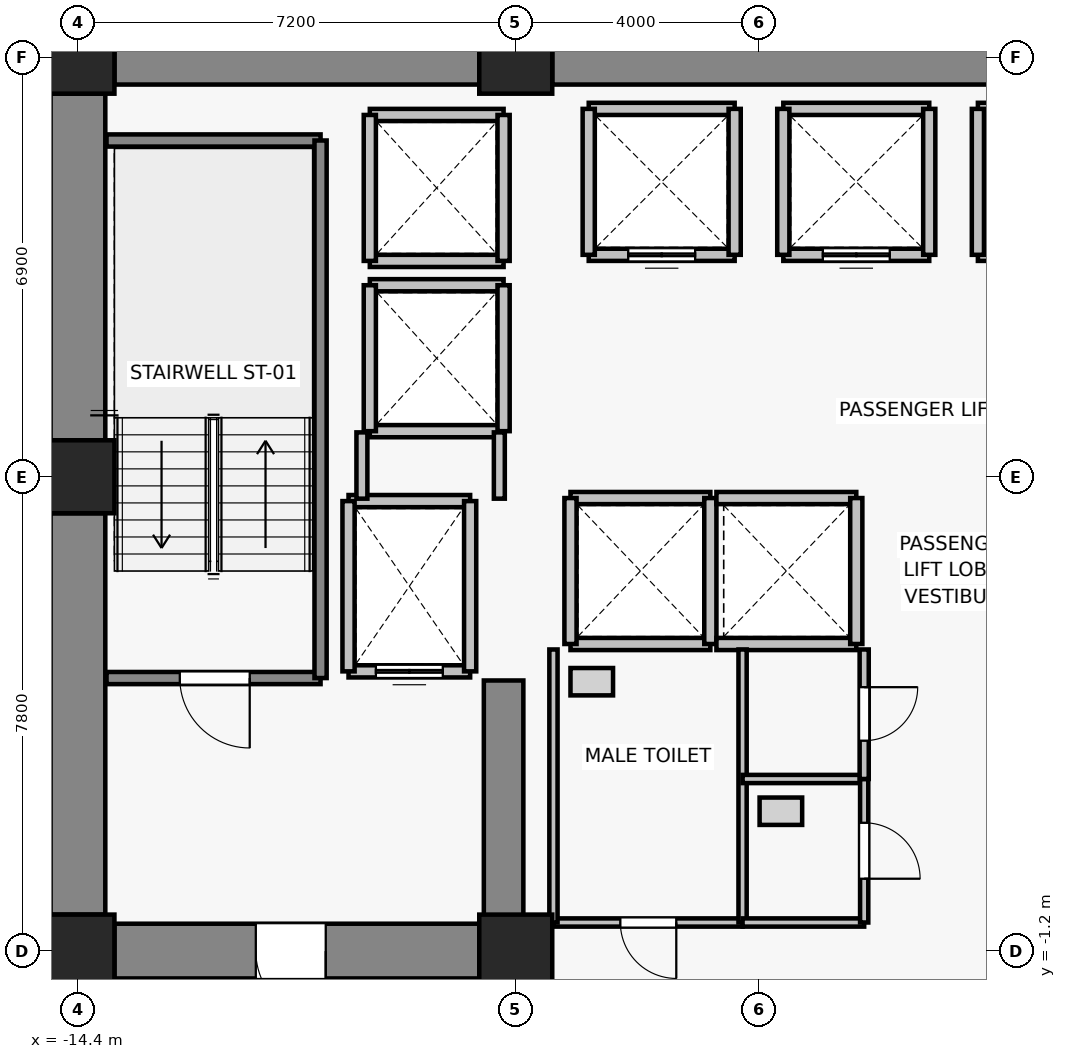
"""IFC4 building model, lengths in metres.
Left out: names, types, materials, properties, quantities, classifications, styles, units other than length and angle.
Written with IfcOpenShell. Run it as: python <this file> out.ifc"""

import sys

from ifc_helpers import new_model, si_unit, direction, frame, frame_2d, origin, origin_2d, place, context, subcontext, project, spatial, rectangle, extrude, source, transform, mapped, element, fill, save


model = new_model("IFC4")
c1 = context("Model", 3, precision=1e-05, world=origin(), true_north=direction((0.0, 1.0)))
c2 = subcontext(c1, "Body", "Model", "MODEL_VIEW")
j1 = project(units=[si_unit("LENGTHUNIT", "METRE"), si_unit("PLANEANGLEUNIT", "RADIAN")], contexts=[c1])
p1 = place(None, origin())
s1 = spatial("IfcSite", under=j1, at=p1, CompositionType="ELEMENT")
p2 = place(p1, origin())
s2 = spatial("IfcBuilding", under=s1, at=p2, CompositionType="ELEMENT")
p3 = place(p2, frame((0.0, 0.0, 47.2)))
s3 = spatial("IfcBuildingStorey", under=s2, at=p3, CompositionType="ELEMENT", Elevation=47.2)
for number, where, z_axis, x_axis in (
    (1, (-14.4, -1.2, 0.0), (0.0, 0.0, 1.0), (1.0, 0.0, 0.0)),
    (2, (-7.2, -1.2, 0.0), (0.0, 0.0, 1.0), (1.0, 0.0, 0.0)),
    (3, (-14.4, 6.6, 0.0), (0.0, 0.0, 1.0), (1.0, 0.0, 0.0)),
    (4, (-14.4, 13.5, 0.0), (0.0, 0.0, 1.0), (1.0, 0.0, 0.0)),
    (5, (-7.2, 13.5, 0.0), (0.0, 0.0, 1.0), (1.0, 0.0, 0.0)),
):
    element("IfcColumn", number, at=place(p3, frame(where, z_axis=z_axis, x_axis=x_axis)), inside=s3, PredefinedType="COLUMN", context=c2, shape_type="SweptSolid", body=[
        extrude(rectangle(XDim=1.2, YDim=1.2, at=origin_2d()), origin(), (0.0, 0.0, 1.0), 3.3),
    ])
p4 = place(p3, frame((-13.8, 13.5, 0.0), z_axis=(0.0, 0.0, 1.0), x_axis=(1.0, 0.0, 0.0)))
e6 = element("IfcWall", 6, at=p4, inside=s3, PredefinedType="SHEAR", context=c2, shape_type="SweptSolid", body=[
    extrude(rectangle(XDim=6.0, YDim=0.9, at=frame_2d((3.0, 0.0))), origin(), (0.0, 0.0, 1.0), 3.075),
])
p5 = place(p3, frame((-6.6, 13.5, 0.0), z_axis=(0.0, 0.0, 1.0), x_axis=(1.0, 0.0, 0.0)))
e7 = element("IfcWall", 7, at=p5, inside=s3, PredefinedType="SHEAR", context=c2, shape_type="SweptSolid", body=[
    extrude(rectangle(XDim=13.2, YDim=0.9, at=frame_2d((6.6, 0.0))), origin(), (0.0, 0.0, 1.0), 3.075),
])
p6 = place(p3, frame((-14.4, -0.6, 0.0), z_axis=(0.0, 0.0, 1.0), x_axis=(0.0, 1.0, 0.0)))
e8 = element("IfcWall", 8, at=p6, inside=s3, PredefinedType="SHEAR", context=c2, shape_type="SweptSolid", body=[
    extrude(rectangle(XDim=6.6, YDim=0.9, at=frame_2d((3.3, 0.0))), origin(), (0.0, 0.0, 1.0), 3.075),
])
p7 = place(p3, frame((-14.4, 7.2, 0.0), z_axis=(0.0, 0.0, 1.0), x_axis=(0.0, 1.0, 0.0)))
e9 = element("IfcWall", 9, at=p7, inside=s3, PredefinedType="SHEAR", context=c2, shape_type="SweptSolid", body=[
    extrude(rectangle(XDim=5.7, YDim=0.9, at=frame_2d((2.85, 0.0))), origin(), (0.0, 0.0, 1.0), 3.075),
])
p8 = place(p3, frame((-7.8, -1.2, 0.0), z_axis=(0.0, 0.0, 1.0), x_axis=(-1.0, 0.0, 0.0)))
e10 = element("IfcWall", 10, at=p8, inside=s3, PredefinedType="SHEAR", context=c2, shape_type="SweptSolid", body=[
    extrude(rectangle(XDim=6.0, YDim=0.9, at=frame_2d((3.0, 0.0))), origin(), (0.0, 0.0, 1.0), 3.075),
])
p9 = place(p8, frame((2.525, 0.0, 0.0)))
e11 = element("IfcOpeningElement", 11, at=p9, cuts=e10, PredefinedType="OPENING", context=c2, shape_type="SweptSolid", body=[
    extrude(rectangle(XDim=1.15, YDim=2.15, at=frame_2d((0.575, 1.075))), frame((0.0, 0.46, 0.0), z_axis=(0.0, -1.0, 0.0), x_axis=(1.0, 0.0, 0.0)), (0.0, 0.0, 1.0), 0.92),
])
p10 = place(p3, frame((-7.4, -0.75, 0.0), z_axis=(0.0, 0.0, 1.0), x_axis=(0.0, 1.0, 0.0)))
e12 = element("IfcWall", 12, at=p10, inside=s3, PredefinedType="SHEAR", context=c2, shape_type="SweptSolid", body=[
    extrude(rectangle(XDim=4.0, YDim=0.65, at=frame_2d((2.0, 0.0))), origin(), (0.0, 0.0, 1.0), 3.075),
])
p11 = place(p3, frame((-7.95, 3.4, 0.0), z_axis=(0.0, 0.0, 1.0), x_axis=(-1.0, 0.0, 0.0)))
e13 = element("IfcWall", 13, at=p11, inside=s3, PredefinedType="SOLIDWALL", context=c2, shape_type="SweptSolid", body=[
    extrude(rectangle(XDim=2.0, YDim=0.2, at=frame_2d((1.0, 0.0))), origin(), (0.0, 0.0, 1.0), 3.075),
])
p12 = place(p11, frame((0.45, 0.0, 0.0)))
e14 = element("IfcOpeningElement", 14, at=p12, cuts=e13, PredefinedType="OPENING", context=c2, shape_type="SweptSolid", body=[
    extrude(rectangle(XDim=1.1, YDim=2.2, at=frame_2d((0.55, 1.1))), frame((0.0, 0.11, 0.0), z_axis=(0.0, -1.0, 0.0), x_axis=(1.0, 0.0, 0.0)), (0.0, 0.0, 1.0), 0.22),
])
p13 = place(p3, frame((-9.95, 6.2, 0.0), z_axis=(0.0, 0.0, 1.0), x_axis=(1.0, 0.0, 0.0)))
e15 = element("IfcWall", 15, at=p13, inside=s3, PredefinedType="SOLIDWALL", context=c2, shape_type="SweptSolid", body=[
    extrude(rectangle(XDim=2.0, YDim=0.2, at=frame_2d((1.0, 0.0))), origin(), (0.0, 0.0, 1.0), 3.075),
])
for number, where, z_axis, x_axis in (
    (16, (-9.95, 3.4, 0.0), (0.0, 0.0, 1.0), (0.0, 1.0, 0.0)),
    (17, (-7.95, 6.2, 0.0), (0.0, 0.0, 1.0), (0.0, -1.0, 0.0)),
):
    element("IfcWall", number, at=place(p3, frame(where, z_axis=z_axis, x_axis=x_axis)), inside=s3, PredefinedType="SOLIDWALL", context=c2, shape_type="SweptSolid", body=[
        extrude(rectangle(XDim=2.8, YDim=0.2, at=frame_2d((1.4, 0.0))), origin(), (0.0, 0.0, 1.0), 3.075),
    ])
p14 = place(p3, frame((-3.6, 10.25, 0.0), z_axis=(0.0, 0.0, 1.0), x_axis=(-1.0, 0.0, 0.0)))
e18 = element("IfcWall", 18, at=p14, inside=s3, PredefinedType="SOLIDWALL", context=c2, shape_type="SweptSolid", body=[
    extrude(rectangle(XDim=2.4, YDim=0.2, at=frame_2d((1.2, 0.0))), origin(), (0.0, 0.0, 1.0), 3.075),
])
p15 = place(p14, frame((0.65, 0.0, 0.0)))
e19 = element("IfcOpeningElement", 19, at=p15, cuts=e18, PredefinedType="OPENING", context=c2, shape_type="SweptSolid", body=[
    extrude(rectangle(XDim=1.1, YDim=2.2, at=frame_2d((0.55, 1.1))), frame((0.0, 0.11, 0.0), z_axis=(0.0, -1.0, 0.0), x_axis=(1.0, 0.0, 0.0)), (0.0, 0.0, 1.0), 0.22),
])
for number, where, z_axis, x_axis in (
    (20, (-6.0, 12.65, 0.0), (0.0, 0.0, 1.0), (1.0, 0.0, 0.0)),
    (21, (-6.0, 10.25, 0.0), (0.0, 0.0, 1.0), (0.0, 1.0, 0.0)),
    (22, (-3.6, 12.65, 0.0), (0.0, 0.0, 1.0), (0.0, -1.0, 0.0)),
):
    element("IfcWall", number, at=place(p3, frame(where, z_axis=z_axis, x_axis=x_axis)), inside=s3, PredefinedType="SOLIDWALL", context=c2, shape_type="SweptSolid", body=[
        extrude(rectangle(XDim=2.4, YDim=0.2, at=frame_2d((1.2, 0.0))), origin(), (0.0, 0.0, 1.0), 3.075),
    ])
p16 = place(p3, frame((-0.4, 10.25, 0.0), z_axis=(0.0, 0.0, 1.0), x_axis=(-1.0, 0.0, 0.0)))
e23 = element("IfcWall", 23, at=p16, inside=s3, PredefinedType="SOLIDWALL", context=c2, shape_type="SweptSolid", body=[
    extrude(rectangle(XDim=2.4, YDim=0.2, at=frame_2d((1.2, 0.0))), origin(), (0.0, 0.0, 1.0), 3.075),
])
p17 = place(p16, frame((0.65, 0.0, 0.0)))
e24 = element("IfcOpeningElement", 24, at=p17, cuts=e23, PredefinedType="OPENING", context=c2, shape_type="SweptSolid", body=[
    extrude(rectangle(XDim=1.1, YDim=2.2, at=frame_2d((0.55, 1.1))), frame((0.0, 0.11, 0.0), z_axis=(0.0, -1.0, 0.0), x_axis=(1.0, 0.0, 0.0)), (0.0, 0.0, 1.0), 0.22),
])
p18 = place(p3, frame((-2.8, 12.65, 0.0), z_axis=(0.0, 0.0, 1.0), x_axis=(1.0, 0.0, 0.0)))
e25 = element("IfcWall", 25, at=p18, inside=s3, PredefinedType="SOLIDWALL", context=c2, shape_type="SweptSolid", body=[
    extrude(rectangle(XDim=2.4, YDim=0.2, at=frame_2d((1.2, 0.0))), origin(), (0.0, 0.0, 1.0), 3.075),
])
for number, where, z_axis, x_axis in (
    (26, (-2.8, 10.25, 0.0), (0.0, 0.0, 1.0), (0.0, 1.0, 0.0)),
    (27, (-0.4, 12.65, 0.0), (0.0, 0.0, 1.0), (0.0, -1.0, 0.0)),
):
    element("IfcWall", number, at=place(p3, frame(where, z_axis=z_axis, x_axis=x_axis)), inside=s3, PredefinedType="SOLIDWALL", context=c2, shape_type="SweptSolid", body=[
        extrude(rectangle(XDim=2.4, YDim=0.2, at=frame_2d((1.2, 0.0))), origin(), (0.0, 0.0, 1.0), 3.075),
    ])
p19 = place(p3, frame((2.8, 10.25, 0.0), z_axis=(0.0, 0.0, 1.0), x_axis=(-1.0, 0.0, 0.0)))
e28 = element("IfcWall", 28, at=p19, inside=s3, PredefinedType="SOLIDWALL", context=c2, shape_type="SweptSolid", body=[
    extrude(rectangle(XDim=2.4, YDim=0.2, at=frame_2d((1.2, 0.0))), origin(), (0.0, 0.0, 1.0), 3.075),
])
p20 = place(p19, frame((0.65, 0.0, 0.0)))
e29 = element("IfcOpeningElement", 29, at=p20, cuts=e28, PredefinedType="OPENING", context=c2, shape_type="SweptSolid", body=[
    extrude(rectangle(XDim=1.1, YDim=2.2, at=frame_2d((0.55, 1.1))), frame((0.0, 0.11, 0.0), z_axis=(0.0, -1.0, 0.0), x_axis=(1.0, 0.0, 0.0)), (0.0, 0.0, 1.0), 0.22),
])
p21 = place(p3, frame((0.4, 12.65, 0.0), z_axis=(0.0, 0.0, 1.0), x_axis=(1.0, 0.0, 0.0)))
e30 = element("IfcWall", 30, at=p21, inside=s3, PredefinedType="SOLIDWALL", context=c2, shape_type="SweptSolid", body=[
    extrude(rectangle(XDim=2.4, YDim=0.2, at=frame_2d((1.2, 0.0))), origin(), (0.0, 0.0, 1.0), 3.075),
])
p22 = place(p3, frame((0.4, 10.25, 0.0), z_axis=(0.0, 0.0, 1.0), x_axis=(0.0, 1.0, 0.0)))
e31 = element("IfcWall", 31, at=p22, inside=s3, PredefinedType="SOLIDWALL", context=c2, shape_type="SweptSolid", body=[
    extrude(rectangle(XDim=2.4, YDim=0.2, at=frame_2d((1.2, 0.0))), origin(), (0.0, 0.0, 1.0), 3.075),
])
for number, where, z_axis, x_axis in (
    (32, (-4.0, 3.85, 0.0), (0.0, 0.0, 1.0), (-1.0, 0.0, 0.0)),
    (33, (-6.3, 6.25, 0.0), (0.0, 0.0, 1.0), (1.0, 0.0, 0.0)),
):
    element("IfcWall", number, at=place(p3, frame(where, z_axis=z_axis, x_axis=x_axis)), inside=s3, PredefinedType="SOLIDWALL", context=c2, shape_type="SweptSolid", body=[
        extrude(rectangle(XDim=2.3, YDim=0.2, at=frame_2d((1.15, 0.0))), origin(), (0.0, 0.0, 1.0), 3.075),
    ])
for number, where, z_axis, x_axis in (
    (34, (-6.3, 3.85, 0.0), (0.0, 0.0, 1.0), (0.0, 1.0, 0.0)),
    (35, (-4.0, 6.25, 0.0), (0.0, 0.0, 1.0), (0.0, -1.0, 0.0)),
):
    element("IfcWall", number, at=place(p3, frame(where, z_axis=z_axis, x_axis=x_axis)), inside=s3, PredefinedType="SOLIDWALL", context=c2, shape_type="SweptSolid", body=[
        extrude(rectangle(XDim=2.4, YDim=0.2, at=frame_2d((1.2, 0.0))), origin(), (0.0, 0.0, 1.0), 3.075),
    ])
for number, where, z_axis, x_axis in (
    (36, (-1.6, 3.85, 0.0), (0.0, 0.0, 1.0), (-1.0, 0.0, 0.0)),
    (37, (-3.9, 6.25, 0.0), (0.0, 0.0, 1.0), (1.0, 0.0, 0.0)),
):
    element("IfcWall", number, at=place(p3, frame(where, z_axis=z_axis, x_axis=x_axis)), inside=s3, PredefinedType="SOLIDWALL", context=c2, shape_type="SweptSolid", body=[
        extrude(rectangle(XDim=2.3, YDim=0.2, at=frame_2d((1.15, 0.0))), origin(), (0.0, 0.0, 1.0), 3.075),
    ])
p23 = place(p3, frame((-1.6, 6.25, 0.0), z_axis=(0.0, 0.0, 1.0), x_axis=(0.0, -1.0, 0.0)))
e38 = element("IfcWall", 38, at=p23, inside=s3, PredefinedType="SOLIDWALL", context=c2, shape_type="SweptSolid", body=[
    extrude(rectangle(XDim=2.4, YDim=0.2, at=frame_2d((1.2, 0.0))), origin(), (0.0, 0.0, 1.0), 3.075),
])
for number, where, z_axis, x_axis in (
    (39, (-7.4, 7.35, 0.0), (0.0, 0.0, 1.0), (-1.0, 0.0, 0.0)),
    (40, (-9.6, 9.75, 0.0), (0.0, 0.0, 1.0), (1.0, 0.0, 0.0)),
):
    element("IfcWall", number, at=place(p3, frame(where, z_axis=z_axis, x_axis=x_axis)), inside=s3, PredefinedType="SOLIDWALL", context=c2, shape_type="SweptSolid", body=[
        extrude(rectangle(XDim=2.2, YDim=0.2, at=frame_2d((1.1, 0.0))), origin(), (0.0, 0.0, 1.0), 2.465),
    ])
p24 = place(p3, frame((-9.6, 7.35, 0.0), z_axis=(0.0, 0.0, 1.0), x_axis=(0.0, 1.0, 0.0)))
e41 = element("IfcWall", 41, at=p24, inside=s3, PredefinedType="SOLIDWALL", context=c2, shape_type="SweptSolid", body=[
    extrude(rectangle(XDim=2.4, YDim=0.2, at=frame_2d((1.2, 0.0))), origin(), (0.0, 0.0, 1.0), 3.075),
])
p25 = place(p3, frame((-7.4, 9.75, 0.0), z_axis=(0.0, 0.0, 1.0), x_axis=(0.0, -1.0, 0.0)))
e42 = element("IfcWall", 42, at=p25, inside=s3, PredefinedType="SOLIDWALL", context=c2, shape_type="SweptSolid", body=[
    extrude(rectangle(XDim=2.4, YDim=0.2, at=frame_2d((1.2, 0.0))), origin(), (0.0, 0.0, 1.0), 2.465),
])
for number, where, z_axis, x_axis in (
    (43, (-7.4, 10.15, 0.0), (0.0, 0.0, 1.0), (-1.0, 0.0, 0.0)),
    (44, (-9.6, 12.55, 0.0), (0.0, 0.0, 1.0), (1.0, 0.0, 0.0)),
):
    element("IfcWall", number, at=place(p3, frame(where, z_axis=z_axis, x_axis=x_axis)), inside=s3, PredefinedType="SOLIDWALL", context=c2, shape_type="SweptSolid", body=[
        extrude(rectangle(XDim=2.2, YDim=0.2, at=frame_2d((1.1, 0.0))), origin(), (0.0, 0.0, 1.0), 2.465),
    ])
p26 = place(p3, frame((-9.6, 10.15, 0.0), z_axis=(0.0, 0.0, 1.0), x_axis=(0.0, 1.0, 0.0)))
e45 = element("IfcWall", 45, at=p26, inside=s3, PredefinedType="SOLIDWALL", context=c2, shape_type="SweptSolid", body=[
    extrude(rectangle(XDim=2.4, YDim=0.2, at=frame_2d((1.2, 0.0))), origin(), (0.0, 0.0, 1.0), 3.075),
])
p27 = place(p3, frame((-7.4, 12.55, 0.0), z_axis=(0.0, 0.0, 1.0), x_axis=(0.0, -1.0, 0.0)))
e46 = element("IfcWall", 46, at=p27, inside=s3, PredefinedType="SOLIDWALL", context=c2, shape_type="SweptSolid", body=[
    extrude(rectangle(XDim=2.4, YDim=0.2, at=frame_2d((1.2, 0.0))), origin(), (0.0, 0.0, 1.0), 2.465),
])
p28 = place(p3, frame((-10.41, 3.29, 0.0), z_axis=(0.0, 0.0, 1.0), x_axis=(-1.0, 0.0, 0.0)))
e47 = element("IfcWall", 47, at=p28, inside=s3, PredefinedType="SOLIDWALL", context=c2, shape_type="SweptSolid", body=[
    extrude(rectangle(XDim=3.52, YDim=0.2, at=frame_2d((1.76, 0.0))), origin(), (0.0, 0.0, 1.0), 3.075),
])
p29 = place(p28, frame((1.165, 0.0, 0.0)))
e48 = element("IfcOpeningElement", 48, at=p29, cuts=e47, PredefinedType="OPENING", context=c2, shape_type="SweptSolid", body=[
    extrude(rectangle(XDim=1.15, YDim=2.15, at=frame_2d((0.575, 1.075))), frame((0.0, 0.11, 0.0), z_axis=(0.0, -1.0, 0.0), x_axis=(1.0, 0.0, 0.0)), (0.0, 0.0, 1.0), 0.22),
])
p30 = place(p3, frame((-13.93, 12.13, 0.0), z_axis=(0.0, 0.0, 1.0), x_axis=(1.0, 0.0, 0.0)))
e49 = element("IfcWall", 49, at=p30, inside=s3, PredefinedType="SOLIDWALL", context=c2, shape_type="SweptSolid", body=[
    extrude(rectangle(XDim=3.52, YDim=0.2, at=frame_2d((1.76, 0.0))), origin(), (0.0, 0.0, 1.0), 3.075),
])
p31 = place(p3, frame((-10.41, 12.13, 0.0), z_axis=(0.0, 0.0, 1.0), x_axis=(0.0, -1.0, 0.0)))
e50 = element("IfcWall", 50, at=p31, inside=s3, PredefinedType="SOLIDWALL", context=c2, shape_type="SweptSolid", body=[
    extrude(rectangle(XDim=8.84, YDim=0.2, at=frame_2d((4.42, 0.0))), origin(), (0.0, 0.0, 1.0), 3.075),
])
p32 = place(p3, frame((-9.73, 6.24, 0.0), z_axis=(0.0, 0.0, 1.0), x_axis=(0.0, 1.0, 0.0)))
e51 = element("IfcWall", 51, at=p32, inside=s3, PredefinedType="PARTITIONING", context=c2, shape_type="SweptSolid", body=[
    extrude(rectangle(XDim=1.09, YDim=0.18, at=frame_2d((0.545, 0.0))), origin(), (0.0, 0.0, 1.0), 3.075),
])
p33 = place(p3, frame((-7.47, 7.33, 0.0), z_axis=(0.0, 0.0, 1.0), x_axis=(0.0, -1.0, 0.0)))
e52 = element("IfcWall", 52, at=p33, inside=s3, PredefinedType="PARTITIONING", context=c2, shape_type="SweptSolid", body=[
    extrude(rectangle(XDim=1.09, YDim=0.18, at=frame_2d((0.545, 0.0))), origin(), (0.0, 0.0, 1.0), 2.465),
])
p34 = place(p3, frame((-3.47, -0.73, 0.0), z_axis=(0.0, 0.0, 1.0), x_axis=(-1.0, 0.0, 0.0)))
e53 = element("IfcWall", 53, at=p34, inside=s3, PredefinedType="PARTITIONING", context=c2, shape_type="SweptSolid", body=[
    extrude(rectangle(XDim=3.11, YDim=0.135, at=frame_2d((1.555, 0.0))), origin(), (0.0, 0.0, 1.0), 3.075),
])
p35 = place(p34, frame((1.09, 0.0, 0.0)))
e54 = element("IfcOpeningElement", 54, at=p35, cuts=e53, PredefinedType="OPENING", context=c2, shape_type="SweptSolid", body=[
    extrude(rectangle(XDim=0.92, YDim=2.1, at=frame_2d((0.46, 1.05))), frame((0.0, 0.077, 0.0), z_axis=(0.0, -1.0, 0.0), x_axis=(1.0, 0.0, 0.0)), (0.0, 0.0, 1.0), 0.155),
])
for number, where, z_axis, x_axis in (
    (55, (-6.58, -0.73, 0.0), (0.0, 0.0, 1.0), (0.0, 1.0, 0.0)),
    (56, (-3.47, 3.76, 0.0), (0.0, 0.0, 1.0), (0.0, -1.0, 0.0)),
):
    element("IfcWall", number, at=place(p3, frame(where, z_axis=z_axis, x_axis=x_axis)), inside=s3, PredefinedType="PARTITIONING", context=c2, shape_type="SweptSolid", body=[
        extrude(rectangle(XDim=4.49, YDim=0.135, at=frame_2d((2.245, 0.0))), origin(), (0.0, 0.0, 1.0), 3.075),
    ])
for number, where, z_axis, x_axis in (
    (57, (-1.47, -0.73, 0.0), (0.0, 0.0, 1.0), (-1.0, 0.0, 0.0)),
    (58, (-3.47, 1.63, 0.0), (0.0, 0.0, 1.0), (1.0, 0.0, 0.0)),
):
    element("IfcWall", number, at=place(p3, frame(where, z_axis=z_axis, x_axis=x_axis)), inside=s3, PredefinedType="PARTITIONING", context=c2, shape_type="SweptSolid", body=[
        extrude(rectangle(XDim=2.0, YDim=0.135, at=frame_2d((1.0, 0.0))), origin(), (0.0, 0.0, 1.0), 3.075),
    ])
p36 = place(p3, frame((-1.47, 1.63, 0.0), z_axis=(0.0, 0.0, 1.0), x_axis=(0.0, -1.0, 0.0)))
e59 = element("IfcWall", 59, at=p36, inside=s3, PredefinedType="PARTITIONING", context=c2, shape_type="SweptSolid", body=[
    extrude(rectangle(XDim=2.36, YDim=0.135, at=frame_2d((1.18, 0.0))), origin(), (0.0, 0.0, 1.0), 3.075),
])
p37 = place(p36, frame((0.72, 0.0, 0.0)))
e60 = element("IfcOpeningElement", 60, at=p37, cuts=e59, PredefinedType="OPENING", context=c2, shape_type="SweptSolid", body=[
    extrude(rectangle(XDim=0.92, YDim=2.1, at=frame_2d((0.46, 1.05))), frame((0.0, 0.077, 0.0), z_axis=(0.0, -1.0, 0.0), x_axis=(1.0, 0.0, 0.0)), (0.0, 0.0, 1.0), 0.155),
])
p38 = place(p3, frame((-1.47, 3.76, 0.0), z_axis=(0.0, 0.0, 1.0), x_axis=(0.0, -1.0, 0.0)))
e61 = element("IfcWall", 61, at=p38, inside=s3, PredefinedType="PARTITIONING", context=c2, shape_type="SweptSolid", body=[
    extrude(rectangle(XDim=2.13, YDim=0.15, at=frame_2d((1.065, 0.0))), origin(), (0.0, 0.0, 1.0), 3.075),
])
p39 = place(p38, frame((0.62, 0.0, 0.0)))
e62 = element("IfcOpeningElement", 62, at=p39, cuts=e61, PredefinedType="OPENING", context=c2, shape_type="SweptSolid", body=[
    extrude(rectangle(XDim=0.88, YDim=2.1, at=frame_2d((0.44, 1.05))), frame((0.0, 0.085, 0.0), z_axis=(0.0, -1.0, 0.0), x_axis=(1.0, 0.0, 0.0)), (0.0, 0.0, 1.0), 0.17),
])
m1 = source(origin(), c2, "Body", "SweptSolid", [
    extrude(rectangle(XDim=1.1, YDim=2.2, at=frame_2d((0.55, 1.1))), frame((0.0, 0.025, 0.0), z_axis=(0.0, -1.0, 0.0), x_axis=(1.0, 0.0, 0.0)), (0.0, 0.0, 1.0), 0.05),
])
p40 = place(p12, origin())
e63 = element("IfcDoor", 63, at=p40, inside=s3, OperationType="DOUBLE_DOOR_SLIDING", PredefinedType="DOOR", context=c2, shape_type="MappedRepresentation", body=[
    mapped(m1, transform((0.0, 0.0, 0.0), x_axis=(1.0, 0.0, 0.0), y_axis=(0.0, 1.0, 0.0), z_axis=(0.0, 0.0, 1.0), scale=1.0)),
])
fill(e14, e63)
p41 = place(p15, origin())
e64 = element("IfcDoor", 64, at=p41, inside=s3, OperationType="DOUBLE_DOOR_SLIDING", PredefinedType="DOOR", context=c2, shape_type="MappedRepresentation", body=[
    mapped(m1, transform((0.0, 0.0, 0.0), x_axis=(1.0, 0.0, 0.0), y_axis=(0.0, 1.0, 0.0), z_axis=(0.0, 0.0, 1.0), scale=1.0)),
])
fill(e19, e64)
p42 = place(p17, origin())
e65 = element("IfcDoor", 65, at=p42, inside=s3, OperationType="DOUBLE_DOOR_SLIDING", PredefinedType="DOOR", context=c2, shape_type="MappedRepresentation", body=[
    mapped(m1, transform((0.0, 0.0, 0.0), x_axis=(1.0, 0.0, 0.0), y_axis=(0.0, 1.0, 0.0), z_axis=(0.0, 0.0, 1.0), scale=1.0)),
])
fill(e24, e65)
m2 = source(origin(), c2, "Body", "SweptSolid", [
    extrude(rectangle(XDim=1.15, YDim=2.15, at=frame_2d((0.575, 1.075))), frame((0.0, 0.025, 0.0), z_axis=(0.0, -1.0, 0.0), x_axis=(1.0, 0.0, 0.0)), (0.0, 0.0, 1.0), 0.05),
])
p43 = place(p29, origin())
e66 = element("IfcDoor", 66, at=p43, inside=s3, OperationType="SINGLE_SWING_LEFT", PredefinedType="DOOR", context=c2, shape_type="MappedRepresentation", body=[
    mapped(m2, transform((0.0, 0.0, 0.0), x_axis=(1.0, 0.0, 0.0), y_axis=(0.0, 1.0, 0.0), z_axis=(0.0, 0.0, 1.0), scale=1.0)),
])
fill(e48, e66)
p44 = place(p9, origin())
e67 = element("IfcDoor", 67, at=p44, inside=s3, OperationType="SINGLE_SWING_LEFT", PredefinedType="DOOR", context=c2, shape_type="MappedRepresentation", body=[
    mapped(m2, transform((0.0, 0.0, 0.0), x_axis=(1.0, 0.0, 0.0), y_axis=(0.0, 1.0, 0.0), z_axis=(0.0, 0.0, 1.0), scale=1.0)),
])
fill(e11, e67)
m3 = source(origin(), c2, "Body", "SweptSolid", [
    extrude(rectangle(XDim=0.92, YDim=2.1, at=frame_2d((0.46, 1.05))), frame((0.0, 0.025, 0.0), z_axis=(0.0, -1.0, 0.0), x_axis=(1.0, 0.0, 0.0)), (0.0, 0.0, 1.0), 0.05),
])
p45 = place(p35, origin())
e68 = element("IfcDoor", 68, at=p45, inside=s3, OperationType="SINGLE_SWING_LEFT", PredefinedType="DOOR", context=c2, shape_type="MappedRepresentation", body=[
    mapped(m3, transform((0.0, 0.0, 0.0), x_axis=(1.0, 0.0, 0.0), y_axis=(0.0, 1.0, 0.0), z_axis=(0.0, 0.0, 1.0), scale=1.0)),
])
fill(e54, e68)
p46 = place(p37, origin())
e69 = element("IfcDoor", 69, at=p46, inside=s3, OperationType="SINGLE_SWING_RIGHT", PredefinedType="DOOR", context=c2, shape_type="MappedRepresentation", body=[
    mapped(m3, transform((0.0, 0.0, 0.0), x_axis=(1.0, 0.0, 0.0), y_axis=(0.0, 1.0, 0.0), z_axis=(0.0, 0.0, 1.0), scale=1.0)),
])
fill(e60, e69)
m4 = source(origin(), c2, "Body", "SweptSolid", [
    extrude(rectangle(XDim=0.88, YDim=2.1, at=frame_2d((0.44, 1.05))), frame((0.0, 0.025, 0.0), z_axis=(0.0, -1.0, 0.0), x_axis=(1.0, 0.0, 0.0)), (0.0, 0.0, 1.0), 0.05),
])
p47 = place(p39, origin())
e70 = element("IfcDoor", 70, at=p47, inside=s3, OperationType="SINGLE_SWING_LEFT", PredefinedType="DOOR", context=c2, shape_type="MappedRepresentation", body=[
    mapped(m4, transform((0.0, 0.0, 0.0), x_axis=(1.0, 0.0, 0.0), y_axis=(0.0, 1.0, 0.0), z_axis=(0.0, 0.0, 1.0), scale=1.0)),
])
fill(e62, e70)
save(model, sys.argv[1])
